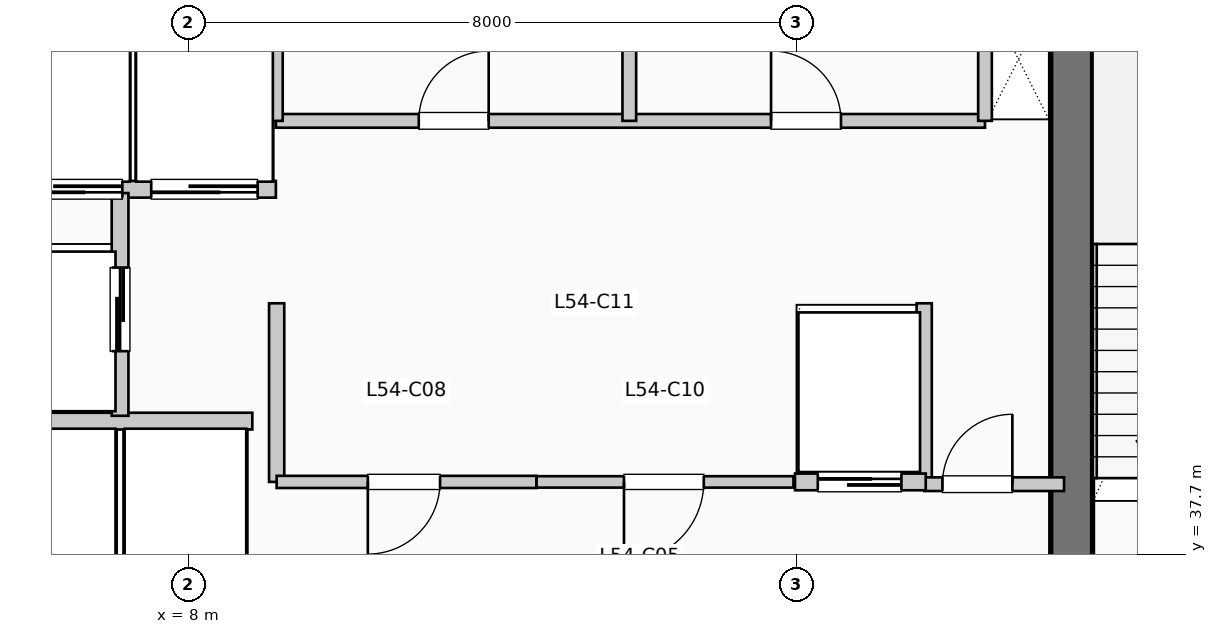
"""IFC4 building model, lengths in metres.
Left out: names, types, materials, properties, quantities, classifications, styles, units other than length and angle.
Written with IfcOpenShell. Run it as: python <this file> out.ifc"""

import sys

from ifc_helpers import new_model, si_unit, direction, frame, frame_2d, origin, place, context, subcontext, project, spatial, rectangle, extrude, element, fill, save


model = new_model("IFC4")
c1 = context("Model", 3, precision=1e-05, world=origin(), true_north=direction((0.0, 1.0)))
c2 = subcontext(c1, "Body", "Model", "MODEL_VIEW")
j1 = project(units=[si_unit("LENGTHUNIT", "METRE"), si_unit("PLANEANGLEUNIT", "RADIAN")], contexts=[c1])
p1 = place(None, origin())
s1 = spatial("IfcSite", under=j1, at=p1, CompositionType="ELEMENT")
p2 = place(p1, origin())
s2 = spatial("IfcBuilding", under=s1, at=p2, CompositionType="ELEMENT")
p3 = place(p2, frame((0.0, 0.0, 223.74)))
s3 = spatial("IfcBuildingStorey", under=s2, at=p3, CompositionType="ELEMENT", Elevation=223.74)
p4 = place(p3, frame((19.62, 37.15, 0.0), z_axis=(0.0, 0.0, 1.0), x_axis=(0.0, 1.0, 0.0)))
e1 = element("IfcWall", 1, at=p4, inside=s3, PredefinedType="SHEAR", context=c2, shape_type="SweptSolid", body=[
    extrude(rectangle(XDim=7.89, YDim=0.55, at=frame_2d((3.945, 0.0))), origin(), (0.0, 0.0, 1.0), 3.96),
])
p5 = place(p3, frame((5.38, 39.45, 0.0), z_axis=(0.0, 0.0, 1.0), x_axis=(1.0, 0.0, 0.0)))
e2 = element("IfcWall", 2, at=p5, inside=s3, PredefinedType="PARTITIONING", context=c2, shape_type="SweptSolid", body=[
    extrude(rectangle(XDim=3.46, YDim=0.22, at=frame_2d((1.73, 0.0))), origin(), (0.0, 0.0, 1.0), 3.71),
])
p6 = place(p3, frame((5.38, 42.5, 0.0), z_axis=(0.0, 0.0, 1.0), x_axis=(1.0, 0.0, 0.0)))
e3 = element("IfcWall", 3, at=p6, inside=s3, PredefinedType="PARTITIONING", context=c2, shape_type="SweptSolid", body=[
    extrude(rectangle(XDim=3.77, YDim=0.22, at=frame_2d((1.885, 0.0))), origin(), (0.0, 0.0, 1.0), 3.71),
])
p7 = place(p6, frame((1.75, 0.0, 0.0), z_axis=(0.0, 0.0, 1.0), x_axis=(-1.0, 0.0, 0.0)))
e4 = element("IfcOpeningElement", 4, at=p7, cuts=e3, PredefinedType="OPENING", context=c2, shape_type="SweptSolid", body=[
    extrude(rectangle(XDim=1.4, YDim=2.2, at=frame_2d((0.7, 1.1))), frame((0.0, 0.12, 0.0), z_axis=(0.0, -1.0, 0.0), x_axis=(1.0, 0.0, 0.0)), (0.0, 0.0, 1.0), 0.24),
])
p8 = place(p6, frame((3.53, 0.0, 0.0), z_axis=(0.0, 0.0, 1.0), x_axis=(-1.0, 0.0, 0.0)))
e5 = element("IfcOpeningElement", 5, at=p8, cuts=e3, PredefinedType="OPENING", context=c2, shape_type="SweptSolid", body=[
    extrude(rectangle(XDim=1.4, YDim=2.2, at=frame_2d((0.7, 1.1))), frame((0.0, 0.12, 0.0), z_axis=(0.0, -1.0, 0.0), x_axis=(1.0, 0.0, 0.0)), (0.0, 0.0, 1.0), 0.24),
])
p9 = place(p3, frame((7.1, 39.52, 0.0), z_axis=(0.0, 0.0, 1.0), x_axis=(0.0, 1.0, 0.0)))
e6 = element("IfcWall", 6, at=p9, inside=s3, PredefinedType="PARTITIONING", context=c2, shape_type="SweptSolid", body=[
    extrude(rectangle(XDim=2.93, YDim=0.22, at=frame_2d((1.465, 0.0))), origin(), (0.0, 0.0, 1.0), 3.71),
])
p10 = place(p9, frame((0.85, 0.0, 0.0)))
e7 = element("IfcOpeningElement", 7, at=p10, cuts=e6, PredefinedType="OPENING", context=c2, shape_type="SweptSolid", body=[
    extrude(rectangle(XDim=1.1, YDim=2.2, at=frame_2d((0.55, 1.1))), frame((0.0, 0.12, 0.0), z_axis=(0.0, -1.0, 0.0), x_axis=(1.0, 0.0, 0.0)), (0.0, 0.0, 1.0), 0.24),
])
for number, where, z_axis, x_axis in (
    (8, (9.16, 38.65, 0.0), (0.0, 0.0, 1.0), (0.0, 1.0, 0.0)),
    (9, (17.68, 38.65, 0.0), (0.0, 0.0, 1.0), (0.0, 1.0, 0.0)),
):
    element("IfcWall", number, at=place(p3, frame(where, z_axis=z_axis, x_axis=x_axis)), inside=s3, PredefinedType="PARTITIONING", context=c2, shape_type="SweptSolid", body=[
        extrude(rectangle(XDim=2.35, YDim=0.2, at=frame_2d((1.175, 0.0))), origin(), (0.0, 0.0, 1.0), 3.71),
    ])
p11 = place(p3, frame((17.68, 38.62, 0.0), z_axis=(0.0, 0.0, 1.0), x_axis=(1.0, 0.0, 0.0)))
e10 = element("IfcWall", 10, at=p11, inside=s3, PredefinedType="PARTITIONING", context=c2, shape_type="SweptSolid", body=[
    extrude(rectangle(XDim=1.84, YDim=0.18, at=frame_2d((0.92, 0.0))), origin(), (0.0, 0.0, 1.0), 3.71),
])
p12 = place(p11, frame((0.24, 0.0, 0.0)))
e11 = element("IfcOpeningElement", 11, at=p12, cuts=e10, PredefinedType="OPENING", context=c2, shape_type="SweptSolid", body=[
    extrude(rectangle(XDim=0.92, YDim=2.1, at=frame_2d((0.46, 1.05))), frame((0.0, 0.1, 0.0), z_axis=(0.0, -1.0, 0.0), x_axis=(1.0, 0.0, 0.0)), (0.0, 0.0, 1.0), 0.2),
])
p13 = place(p3, frame((9.16, 38.65, 0.0), z_axis=(0.0, 0.0, 1.0), x_axis=(1.0, 0.0, 0.0)))
e12 = element("IfcWall", 12, at=p13, inside=s3, PredefinedType="PARTITIONING", context=c2, shape_type="SweptSolid", body=[
    extrude(rectangle(XDim=3.42, YDim=0.16, at=frame_2d((1.71, 0.0))), origin(), (0.0, 0.0, 1.0), 3.71),
])
p14 = place(p13, frame((2.15, 0.0, 0.0), z_axis=(0.0, 0.0, 1.0), x_axis=(-1.0, 0.0, 0.0)))
e13 = element("IfcOpeningElement", 13, at=p14, cuts=e12, PredefinedType="OPENING", context=c2, shape_type="SweptSolid", body=[
    extrude(rectangle(XDim=0.95, YDim=2.15, at=frame_2d((0.475, 1.075))), frame((0.0, 0.09, 0.0), z_axis=(0.0, -1.0, 0.0), x_axis=(1.0, 0.0, 0.0)), (0.0, 0.0, 1.0), 0.18),
])
p15 = place(p3, frame((12.58, 38.65, 0.0), z_axis=(0.0, 0.0, 1.0), x_axis=(1.0, 0.0, 0.0)))
e14 = element("IfcWall", 14, at=p15, inside=s3, PredefinedType="PARTITIONING", context=c2, shape_type="SweptSolid", body=[
    extrude(rectangle(XDim=3.38, YDim=0.15, at=frame_2d((1.69, 0.0))), origin(), (0.0, 0.0, 1.0), 3.71),
])
p16 = place(p15, frame((2.2, 0.0, 0.0), z_axis=(0.0, 0.0, 1.0), x_axis=(-1.0, 0.0, 0.0)))
e15 = element("IfcOpeningElement", 15, at=p16, cuts=e14, PredefinedType="OPENING", context=c2, shape_type="SweptSolid", body=[
    extrude(rectangle(XDim=1.05, YDim=2.15, at=frame_2d((0.525, 1.075))), frame((0.0, 0.085, 0.0), z_axis=(0.0, -1.0, 0.0), x_axis=(1.0, 0.0, 0.0)), (0.0, 0.0, 1.0), 0.17),
])
p17 = place(p3, frame((15.98, 38.65, 0.0), z_axis=(0.0, 0.0, 1.0), x_axis=(1.0, 0.0, 0.0)))
e16 = element("IfcWall", 16, at=p17, inside=s3, PredefinedType="PARTITIONING", context=c2, shape_type="SweptSolid", body=[
    extrude(rectangle(XDim=1.72, YDim=0.22, at=frame_2d((0.86, 0.0))), origin(), (0.0, 0.0, 1.0), 3.71),
])
p18 = place(p17, frame((0.3, 0.0, 0.0)))
e17 = element("IfcOpeningElement", 17, at=p18, cuts=e16, PredefinedType="OPENING", context=c2, shape_type="SweptSolid", body=[
    extrude(rectangle(XDim=1.1, YDim=2.2, at=frame_2d((0.55, 1.1))), frame((0.0, 0.12, 0.0), z_axis=(0.0, -1.0, 0.0), x_axis=(1.0, 0.0, 0.0)), (0.0, 0.0, 1.0), 0.24),
])
p19 = place(p3, frame((9.15, 43.4, 0.0), z_axis=(0.0, 0.0, 1.0), x_axis=(1.0, 0.0, 0.0)))
e18 = element("IfcWall", 18, at=p19, inside=s3, PredefinedType="PLUMBINGWALL", context=c2, shape_type="SweptSolid", body=[
    extrude(rectangle(XDim=9.33, YDim=0.18, at=frame_2d((4.665, 0.0))), origin(), (0.0, 0.0, 1.0), 3.71),
])
p20 = place(p19, frame((1.88, 0.0, 0.0)))
e19 = element("IfcOpeningElement", 19, at=p20, cuts=e18, PredefinedType="OPENING", context=c2, shape_type="SweptSolid", body=[
    extrude(rectangle(XDim=0.92, YDim=2.1, at=frame_2d((0.46, 1.05))), frame((0.0, 0.1, 0.0), z_axis=(0.0, -1.0, 0.0), x_axis=(1.0, 0.0, 0.0)), (0.0, 0.0, 1.0), 0.2),
])
p21 = place(p19, frame((6.515, 0.0, 0.0)))
e20 = element("IfcOpeningElement", 20, at=p21, cuts=e18, PredefinedType="OPENING", context=c2, shape_type="SweptSolid", body=[
    extrude(rectangle(XDim=0.92, YDim=2.1, at=frame_2d((0.46, 1.05))), frame((0.0, 0.1, 0.0), z_axis=(0.0, -1.0, 0.0), x_axis=(1.0, 0.0, 0.0)), (0.0, 0.0, 1.0), 0.2),
])
for number, where, z_axis, x_axis in (
    (21, (9.15, 43.4, 0.0), (0.0, 0.0, 1.0), (0.0, 1.0, 0.0)),
    (22, (18.48, 43.4, 0.0), (0.0, 0.0, 1.0), (0.0, 1.0, 0.0)),
    (23, (13.8, 43.4, 0.0), (0.0, 0.0, 1.0), (0.0, 1.0, 0.0)),
):
    element("IfcWall", number, at=place(p3, frame(where, z_axis=z_axis, x_axis=x_axis)), inside=s3, PredefinedType="PLUMBINGWALL", context=c2, shape_type="SweptSolid", body=[
        extrude(rectangle(XDim=1.88, YDim=0.18, at=frame_2d((0.94, 0.0))), origin(), (0.0, 0.0, 1.0), 3.71),
    ])
p22 = place(p7, origin())
e24 = element("IfcDoor", 24, at=p22, inside=s3, OperationType="SLIDING_TO_LEFT", PredefinedType="DOOR", context=c2, shape_type="SweptSolid", body=[
    extrude(rectangle(XDim=1.4, YDim=2.2, at=frame_2d((0.7, 1.1))), frame((0.0, 0.025, 0.0), z_axis=(0.0, -1.0, 0.0), x_axis=(1.0, 0.0, 0.0)), (0.0, 0.0, 1.0), 0.05),
])
fill(e4, e24)
p23 = place(p8, origin())
e25 = element("IfcDoor", 25, at=p23, inside=s3, OperationType="SLIDING_TO_LEFT", PredefinedType="DOOR", context=c2, shape_type="SweptSolid", body=[
    extrude(rectangle(XDim=1.4, YDim=2.2, at=frame_2d((0.7, 1.1))), frame((0.0, 0.025, 0.0), z_axis=(0.0, -1.0, 0.0), x_axis=(1.0, 0.0, 0.0)), (0.0, 0.0, 1.0), 0.05),
])
fill(e5, e25)
p24 = place(p10, origin())
e26 = element("IfcDoor", 26, at=p24, inside=s3, OperationType="SLIDING_TO_LEFT", PredefinedType="DOOR", context=c2, shape_type="SweptSolid", body=[
    extrude(rectangle(XDim=1.1, YDim=2.2, at=frame_2d((0.55, 1.1))), frame((0.0, 0.025, 0.0), z_axis=(0.0, -1.0, 0.0), x_axis=(1.0, 0.0, 0.0)), (0.0, 0.0, 1.0), 0.05),
])
fill(e7, e26)
p25 = place(p12, origin())
e27 = element("IfcDoor", 27, at=p25, inside=s3, OperationType="SINGLE_SWING_RIGHT", PredefinedType="DOOR", context=c2, shape_type="SweptSolid", body=[
    extrude(rectangle(XDim=0.92, YDim=2.1, at=frame_2d((0.46, 1.05))), frame((0.0, 0.025, 0.0), z_axis=(0.0, -1.0, 0.0), x_axis=(1.0, 0.0, 0.0)), (0.0, 0.0, 1.0), 0.05),
])
fill(e11, e27)
p26 = place(p14, origin())
e28 = element("IfcDoor", 28, at=p26, inside=s3, OperationType="SINGLE_SWING_LEFT", PredefinedType="DOOR", context=c2, shape_type="SweptSolid", body=[
    extrude(rectangle(XDim=0.95, YDim=2.15, at=frame_2d((0.475, 1.075))), frame((0.0, 0.025, 0.0), z_axis=(0.0, -1.0, 0.0), x_axis=(1.0, 0.0, 0.0)), (0.0, 0.0, 1.0), 0.05),
])
fill(e13, e28)
p27 = place(p16, origin())
e29 = element("IfcDoor", 29, at=p27, inside=s3, OperationType="SINGLE_SWING_LEFT", PredefinedType="DOOR", context=c2, shape_type="SweptSolid", body=[
    extrude(rectangle(XDim=1.05, YDim=2.15, at=frame_2d((0.525, 1.075))), frame((0.0, 0.025, 0.0), z_axis=(0.0, -1.0, 0.0), x_axis=(1.0, 0.0, 0.0)), (0.0, 0.0, 1.0), 0.05),
])
fill(e15, e29)
p28 = place(p18, origin())
e30 = element("IfcDoor", 30, at=p28, inside=s3, OperationType="SLIDING_TO_LEFT", PredefinedType="DOOR", context=c2, shape_type="SweptSolid", body=[
    extrude(rectangle(XDim=1.1, YDim=2.2, at=frame_2d((0.55, 1.1))), frame((0.0, 0.025, 0.0), z_axis=(0.0, -1.0, 0.0), x_axis=(1.0, 0.0, 0.0)), (0.0, 0.0, 1.0), 0.05),
])
fill(e17, e30)
p29 = place(p20, origin())
e31 = element("IfcDoor", 31, at=p29, inside=s3, OperationType="SINGLE_SWING_RIGHT", PredefinedType="DOOR", context=c2, shape_type="SweptSolid", body=[
    extrude(rectangle(XDim=0.92, YDim=2.1, at=frame_2d((0.46, 1.05))), frame((0.0, 0.025, 0.0), z_axis=(0.0, -1.0, 0.0), x_axis=(1.0, 0.0, 0.0)), (0.0, 0.0, 1.0), 0.05),
])
fill(e19, e31)
p30 = place(p21, origin())
e32 = element("IfcDoor", 32, at=p30, inside=s3, OperationType="SINGLE_SWING_LEFT", PredefinedType="DOOR", context=c2, shape_type="SweptSolid", body=[
    extrude(rectangle(XDim=0.92, YDim=2.1, at=frame_2d((0.46, 1.05))), frame((0.0, 0.025, 0.0), z_axis=(0.0, -1.0, 0.0), x_axis=(1.0, 0.0, 0.0)), (0.0, 0.0, 1.0), 0.05),
])
fill(e20, e32)
save(model, sys.argv[1])
